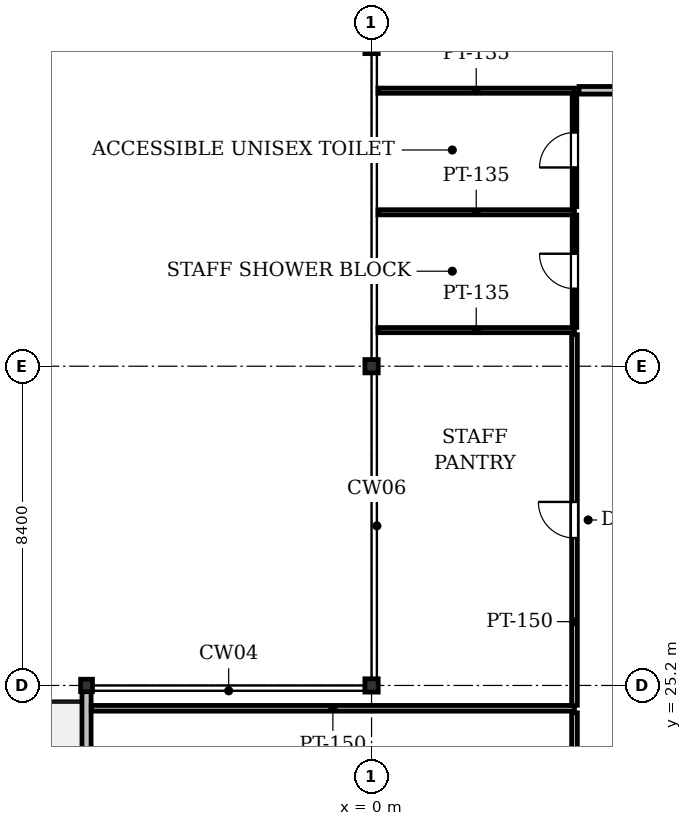
"""IFC4 building model, lengths in metres.
Left out: names, types, materials, properties, quantities, classifications, styles, units other than length and angle.
Written with IfcOpenShell. Run it as: python <this file> out.ifc"""

import sys

from ifc_helpers import new_model, si_unit, direction, frame, frame_2d, origin, origin_2d, place, context, subcontext, project, spatial, rectangle, i_section, extrude, element, fill, save


model = new_model("IFC4")
c1 = context("Model", 3, precision=1e-05, world=origin(), true_north=direction((0.0, 1.0)))
c2 = subcontext(c1, "Body", "Model", "MODEL_VIEW")
j1 = project(units=[si_unit("LENGTHUNIT", "METRE"), si_unit("PLANEANGLEUNIT", "RADIAN")], contexts=[c1])
p1 = place(None, origin())
s1 = spatial("IfcSite", under=j1, at=p1, CompositionType="ELEMENT")
p2 = place(p1, origin())
s2 = spatial("IfcBuilding", under=s1, at=p2, CompositionType="ELEMENT")
p3 = place(p2, frame((0.0, 0.0, 183.7)))
s3 = spatial("IfcBuildingStorey", under=s2, at=p3, CompositionType="ELEMENT", Elevation=183.7)
for number, where, z_axis, x_axis in (
    (1, (0.0, 25.2, 0.0), (0.0, 0.0, 1.0), (1.0, 0.0, 0.0)),
    (2, (0.0, 33.6, 0.0), (0.0, 0.0, 1.0), (1.0, 0.0, 0.0)),
    (3, (0.0, 42.0, 0.0), (0.0, 0.0, 1.0), (1.0, 0.0, 0.0)),
):
    element("IfcColumn", number, at=place(p3, frame(where, z_axis=z_axis, x_axis=x_axis)), inside=s3, PredefinedType="COLUMN", context=c2, shape_type="SweptSolid", body=[
        extrude(i_section(OverallWidth=0.35, OverallDepth=0.35, WebThickness=0.02, FlangeThickness=0.032, at=origin_2d()), origin(), (0.0, 0.0, 1.0), 4.1),
    ])
p4 = place(p3, frame((-7.5, 25.2, 0.0), z_axis=(0.0, 0.0, 1.0), x_axis=(1.0, 0.0, 0.0)))
e4 = element("IfcColumn", 4, at=p4, inside=s3, PredefinedType="COLUMN", context=c2, shape_type="SweptSolid", body=[
    extrude(i_section(OverallWidth=0.311, OverallDepth=0.327, WebThickness=0.016, FlangeThickness=0.025, FilletRadius=0.017, at=origin_2d()), origin(), (0.0, 0.0, 1.0), 4.1),
])
p5 = place(p3, frame((-7.5, 16.963, 0.0), z_axis=(0.0, 0.0, 1.0), x_axis=(0.0, 1.0, 0.0)))
e5 = element("IfcWall", 5, at=p5, inside=s3, PredefinedType="STANDARD", context=c2, shape_type="SweptSolid", body=[
    extrude(rectangle(XDim=8.073, YDim=0.24, at=frame_2d((4.037, 0.0))), origin(), (0.0, 0.0, 1.0), 3.422),
])
p6 = place(p5, frame((0.3, 0.0, 0.0)))
e6 = element("IfcOpeningElement", 6, at=p6, cuts=e5, PredefinedType="OPENING", context=c2, shape_type="SweptSolid", body=[
    extrude(rectangle(XDim=1.2, YDim=2.2, at=frame_2d((0.6, 1.1))), frame((0.0, 0.13, 0.0), z_axis=(0.0, -1.0, 0.0), x_axis=(1.0, 0.0, 0.0)), (0.0, 0.0, 1.0), 0.26),
])
p7 = place(p5, frame((3.053, 0.0, 0.9)))
e7 = element("IfcOpeningElement", 7, at=p7, cuts=e5, PredefinedType="OPENING", context=c2, shape_type="SweptSolid", body=[
    extrude(rectangle(XDim=1.5, YDim=1.6, at=frame_2d((0.75, 0.8))), frame((0.0, 0.13, 0.0), z_axis=(0.0, -1.0, 0.0), x_axis=(1.0, 0.0, 0.0)), (0.0, 0.0, 1.0), 0.26),
])
for number, where, z_axis, x_axis in (
    (8, (5.34, 37.65, 0.0), (0.0, 0.0, 1.0), (-1.0, 0.0, 0.0)),
    (9, (0.169, 34.55, 0.0), (0.0, 0.0, 1.0), (1.0, 0.0, 0.0)),
):
    element("IfcWall", number, at=place(p3, frame(where, z_axis=z_axis, x_axis=x_axis)), inside=s3, PredefinedType="PARTITIONING", context=c2, shape_type="SweptSolid", body=[
        extrude(rectangle(XDim=5.171, YDim=0.135, at=frame_2d((2.585, 0.0))), origin(), (0.0, 0.0, 1.0), 3.518),
    ])
p8 = place(p3, frame((5.34, 34.622, 0.0), z_axis=(0.0, 0.0, 1.0), x_axis=(0.0, 1.0, 0.0)))
e10 = element("IfcWall", 10, at=p8, inside=s3, PredefinedType="PARTITIONING", context=c2, shape_type="SweptSolid", body=[
    extrude(rectangle(XDim=2.957, YDim=0.12, at=frame_2d((1.479, 0.0))), origin(), (0.0, 0.0, 1.0), 3.825),
])
p9 = place(p8, frame((1.019, 0.0, 0.0)))
e11 = element("IfcOpeningElement", 11, at=p9, cuts=e10, PredefinedType="OPENING", context=c2, shape_type="SweptSolid", body=[
    extrude(rectangle(XDim=0.92, YDim=2.1, at=frame_2d((0.46, 1.05))), frame((0.0, 0.07, 0.0), z_axis=(0.0, -1.0, 0.0), x_axis=(1.0, 0.0, 0.0)), (0.0, 0.0, 1.0), 0.14),
])
p10 = place(p3, frame((5.34, 40.85, 0.0), z_axis=(0.0, 0.0, 1.0), x_axis=(-1.0, 0.0, 0.0)))
e12 = element("IfcWall", 12, at=p10, inside=s3, PredefinedType="PARTITIONING", context=c2, shape_type="SweptSolid", body=[
    extrude(rectangle(XDim=5.171, YDim=0.135, at=frame_2d((2.585, 0.0))), origin(), (0.0, 0.0, 1.0), 3.518),
])
p11 = place(p3, frame((5.34, 37.8, 0.0), z_axis=(0.0, 0.0, 1.0), x_axis=(0.0, 1.0, 0.0)))
e13 = element("IfcWall", 13, at=p11, inside=s3, PredefinedType="PARTITIONING", context=c2, shape_type="SweptSolid", body=[
    extrude(rectangle(XDim=2.979, YDim=0.12, at=frame_2d((1.489, 0.0))), origin(), (0.0, 0.0, 1.0), 3.825),
])
p12 = place(p11, frame((1.029, 0.0, 0.0)))
e14 = element("IfcOpeningElement", 14, at=p12, cuts=e13, PredefinedType="OPENING", context=c2, shape_type="SweptSolid", body=[
    extrude(rectangle(XDim=0.92, YDim=2.1, at=frame_2d((0.46, 1.05))), frame((0.0, 0.07, 0.0), z_axis=(0.0, -1.0, 0.0), x_axis=(1.0, 0.0, 0.0)), (0.0, 0.0, 1.0), 0.14),
])
p13 = place(p3, frame((-7.376, 24.599, 0.0), z_axis=(0.0, 0.0, 1.0), x_axis=(1.0, 0.0, 0.0)))
e15 = element("IfcWall", 15, at=p13, inside=s3, PredefinedType="PARTITIONING", context=c2, shape_type="SweptSolid", body=[
    extrude(rectangle(XDim=12.716, YDim=0.15, at=frame_2d((6.358, 0.0))), origin(), (0.0, 0.0, 1.0), 3.223),
])
p14 = place(p3, frame((5.34, 24.678, 0.0), z_axis=(0.0, 0.0, 1.0), x_axis=(0.0, 1.0, 0.0)))
e16 = element("IfcWall", 16, at=p14, inside=s3, PredefinedType="PARTITIONING", context=c2, shape_type="SweptSolid", body=[
    extrude(rectangle(XDim=9.751, YDim=0.15, at=frame_2d((4.876, 0.0))), origin(), (0.0, 0.0, 1.0), 3.213),
])
p15 = place(p14, frame((4.401, 0.0, 0.0)))
e17 = element("IfcOpeningElement", 17, at=p15, cuts=e16, PredefinedType="OPENING", context=c2, shape_type="SweptSolid", body=[
    extrude(rectangle(XDim=0.95, YDim=2.15, at=frame_2d((0.475, 1.075))), frame((0.0, 0.085, 0.0), z_axis=(0.0, -1.0, 0.0), x_axis=(1.0, 0.0, 0.0)), (0.0, 0.0, 1.0), 0.17),
])
p16 = place(p3, frame((5.34, 18.839, 0.0), z_axis=(0.0, 0.0, 1.0), x_axis=(0.0, 1.0, 0.0)))
e18 = element("IfcWall", 18, at=p16, inside=s3, PredefinedType="PARTITIONING", context=c2, shape_type="SweptSolid", body=[
    extrude(rectangle(XDim=5.64, YDim=0.15, at=frame_2d((2.82, 0.0))), origin(), (0.0, 0.0, 1.0), 3.825),
])
p17 = place(p3, frame((5.459, 40.86, 0.0), z_axis=(0.0, 0.0, 1.0), x_axis=(1.0, 0.0, 0.0)))
e19 = element("IfcWall", 19, at=p17, inside=s3, PredefinedType="PARTITIONING", context=c2, shape_type="SweptSolid", body=[
    extrude(rectangle(XDim=2.19, YDim=0.2, at=frame_2d((1.095, 0.0))), origin(), (0.0, 0.0, 1.0), 3.825),
])
p18 = place(p9, origin())
e20 = element("IfcDoor", 20, at=p18, inside=s3, OperationType="SINGLE_SWING_RIGHT", PredefinedType="DOOR", context=c2, shape_type="SweptSolid", body=[
    extrude(rectangle(XDim=0.92, YDim=2.1, at=frame_2d((0.46, 1.05))), frame((0.0, 0.025, 0.0), z_axis=(0.0, -1.0, 0.0), x_axis=(1.0, 0.0, 0.0)), (0.0, 0.0, 1.0), 0.05),
])
fill(e11, e20)
p19 = place(p12, origin())
e21 = element("IfcDoor", 21, at=p19, inside=s3, OperationType="SINGLE_SWING_LEFT", PredefinedType="DOOR", context=c2, shape_type="SweptSolid", body=[
    extrude(rectangle(XDim=0.92, YDim=2.1, at=frame_2d((0.46, 1.05))), frame((0.0, 0.025, 0.0), z_axis=(0.0, -1.0, 0.0), x_axis=(1.0, 0.0, 0.0)), (0.0, 0.0, 1.0), 0.05),
])
fill(e14, e21)
p20 = place(p15, origin())
e22 = element("IfcDoor", 22, at=p20, inside=s3, OperationType="SINGLE_SWING_RIGHT", PredefinedType="DOOR", context=c2, shape_type="SweptSolid", body=[
    extrude(rectangle(XDim=0.95, YDim=2.15, at=frame_2d((0.475, 1.075))), frame((0.0, 0.025, 0.0), z_axis=(0.0, -1.0, 0.0), x_axis=(1.0, 0.0, 0.0)), (0.0, 0.0, 1.0), 0.05),
])
fill(e17, e22)
save(model, sys.argv[1])
